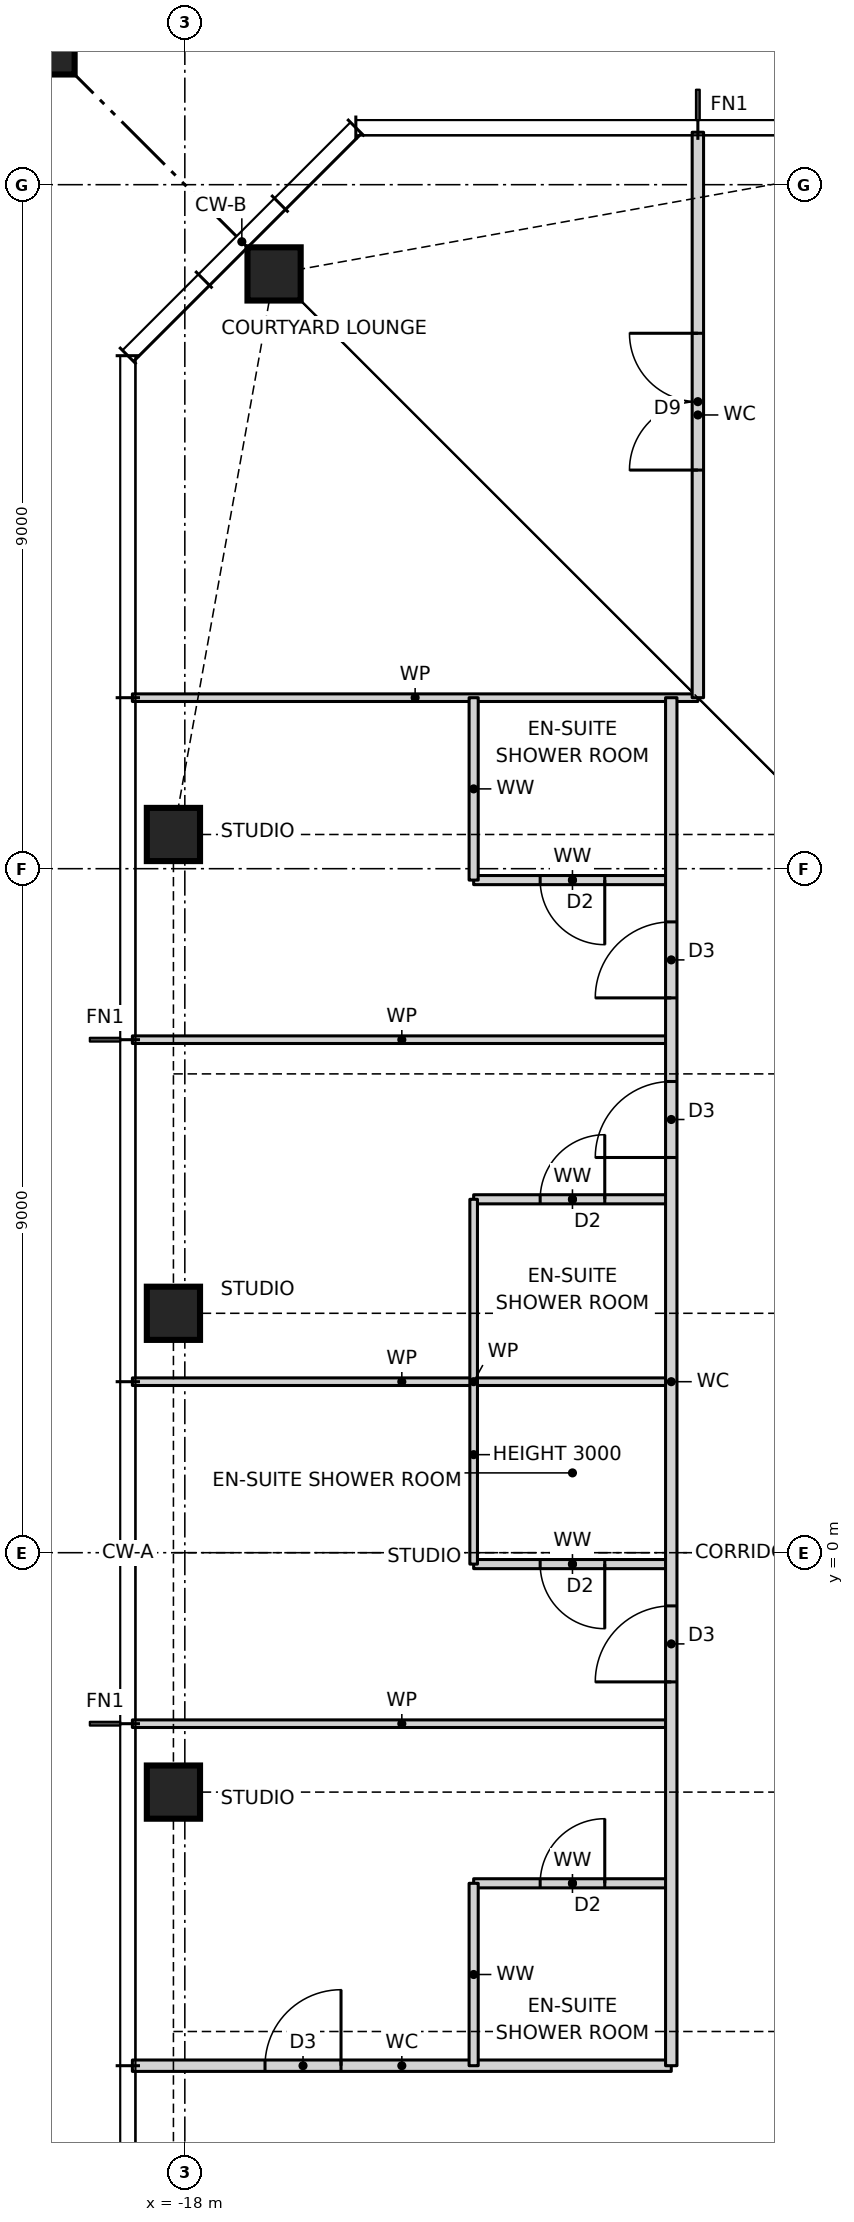
"""IFC4 building model, lengths in metres.
Left out: names, types, materials, properties, quantities, classifications, styles, units other than length and angle.
Written with IfcOpenShell. Run it as: python <this file> out.ifc"""

import sys

from ifc_helpers import new_model, si_unit, direction, frame, frame_2d, origin, origin_2d, place, context, subcontext, project, spatial, rectangle, hollow_rectangle, i_section, extrude, element, fill, save


model = new_model("IFC4")
c1 = context("Model", 3, precision=1e-05, world=origin(), true_north=direction((0.0, 1.0)))
c2 = subcontext(c1, "Body", "Model", "MODEL_VIEW")
j1 = project(units=[si_unit("LENGTHUNIT", "METRE"), si_unit("PLANEANGLEUNIT", "RADIAN")], contexts=[c1])
p1 = place(None, origin())
s1 = spatial("IfcSite", under=j1, at=p1, CompositionType="ELEMENT")
p2 = place(p1, origin())
s2 = spatial("IfcBuilding", under=s1, at=p2, CompositionType="ELEMENT")
p3 = place(p2, frame((0.0, 0.0, 156.5)))
s3 = spatial("IfcBuildingStorey", under=s2, at=p3, CompositionType="ELEMENT", Elevation=156.5)
for number, where, z_axis, x_axis in (
    (1, (-16.826, 16.826, 0.0), (0.0, 0.0, 1.0), (1.0, 0.0, 0.0)),
    (2, (-18.15, 9.45, 0.0), (0.0, 0.0, 1.0), (1.0, 0.0, 0.0)),
    (3, (-18.15, 3.15, 0.0), (0.0, 0.0, 1.0), (1.0, 0.0, 0.0)),
    (4, (-18.15, -3.15, 0.0), (0.0, 0.0, 1.0), (1.0, 0.0, 0.0)),
):
    element("IfcColumn", number, at=place(p3, frame(where, z_axis=z_axis, x_axis=x_axis)), inside=s3, PredefinedType="COLUMN", context=c2, shape_type="SweptSolid", body=[
        extrude(hollow_rectangle(XDim=0.7, YDim=0.7, WallThickness=0.06, at=origin_2d()), origin(), (0.0, 0.0, 1.0), 3.5),
    ])
p4 = place(p3, frame((-21.65, 21.65, 0.0), z_axis=(0.0, 0.0, 1.0), x_axis=(1.0, 0.0, 0.0)))
e5 = element("IfcColumn", 5, at=p4, inside=s3, PredefinedType="COLUMN", context=c2, shape_type="SweptSolid", body=[
    extrude(rectangle(XDim=4.4, YDim=4.4, at=origin_2d()), origin(), (0.0, 0.0, 1.0), 3.5),
    extrude(i_section(OverallWidth=0.478, OverallDepth=0.599, WebThickness=0.1, FlangeThickness=0.14, at=origin_2d()), origin(), (0.0, 0.0, 1.0), 3.5),
])
p5 = place(p3, frame((-18.69, -6.75, 0.0), z_axis=(0.0, 0.0, 1.0), x_axis=(1.0, 0.0, 0.0)))
e6 = element("IfcWall", 6, at=p5, inside=s3, PredefinedType="PARTITIONING", context=c2, shape_type="SweptSolid", body=[
    extrude(rectangle(XDim=7.09, YDim=0.15, at=frame_2d((3.545, 0.0))), origin(), (0.0, 0.0, 1.0), 3.27),
])
p6 = place(p5, frame((1.745, 0.0, 0.0)))
e7 = element("IfcOpeningElement", 7, at=p6, cuts=e6, PredefinedType="OPENING", context=c2, shape_type="SweptSolid", body=[
    extrude(rectangle(XDim=1.0, YDim=2.1, at=frame_2d((0.5, 1.05))), frame((0.0, 0.085, 0.0), z_axis=(0.0, -1.0, 0.0), x_axis=(1.0, 0.0, 0.0)), (0.0, 0.0, 1.0), 0.17),
])
p7 = place(p3, frame((-14.2, -4.35, 0.0), z_axis=(0.0, 0.0, 1.0), x_axis=(1.0, 0.0, 0.0)))
e8 = element("IfcWall", 8, at=p7, inside=s3, PredefinedType="PARTITIONING", context=c2, shape_type="SweptSolid", body=[
    extrude(rectangle(XDim=2.6, YDim=0.12, at=frame_2d((1.3, 0.0))), origin(), (0.0, 0.0, 1.0), 3.27),
])
p8 = place(p7, frame((0.875, 0.0, 0.0)))
e9 = element("IfcOpeningElement", 9, at=p8, cuts=e8, PredefinedType="OPENING", context=c2, shape_type="SweptSolid", body=[
    extrude(rectangle(XDim=0.85, YDim=2.1, at=frame_2d((0.425, 1.05))), frame((0.0, 0.07, 0.0), z_axis=(0.0, -1.0, 0.0), x_axis=(1.0, 0.0, 0.0)), (0.0, 0.0, 1.0), 0.14),
])
p9 = place(p3, frame((-18.69, -2.25, 0.0), z_axis=(0.0, 0.0, 1.0), x_axis=(1.0, 0.0, 0.0)))
e10 = element("IfcWall", 10, at=p9, inside=s3, PredefinedType="PARTITIONING", context=c2, shape_type="SweptSolid", body=[
    extrude(rectangle(XDim=7.09, YDim=0.1, at=frame_2d((3.545, 0.0))), origin(), (0.0, 0.0, 1.0), 3.27),
])
p10 = place(p3, frame((-14.2, -0.15, 0.0), z_axis=(0.0, 0.0, 1.0), x_axis=(1.0, 0.0, 0.0)))
e11 = element("IfcWall", 11, at=p10, inside=s3, PredefinedType="PARTITIONING", context=c2, shape_type="SweptSolid", body=[
    extrude(rectangle(XDim=2.6, YDim=0.12, at=frame_2d((1.3, 0.0))), origin(), (0.0, 0.0, 1.0), 3.27),
])
p11 = place(p10, frame((0.875, 0.0, 0.0)))
e12 = element("IfcOpeningElement", 12, at=p11, cuts=e11, PredefinedType="OPENING", context=c2, shape_type="SweptSolid", body=[
    extrude(rectangle(XDim=0.85, YDim=2.1, at=frame_2d((0.425, 1.05))), frame((0.0, 0.07, 0.0), z_axis=(0.0, -1.0, 0.0), x_axis=(1.0, 0.0, 0.0)), (0.0, 0.0, 1.0), 0.14),
])
p12 = place(p3, frame((-18.69, 2.25, 0.0), z_axis=(0.0, 0.0, 1.0), x_axis=(1.0, 0.0, 0.0)))
e13 = element("IfcWall", 13, at=p12, inside=s3, PredefinedType="PARTITIONING", context=c2, shape_type="SweptSolid", body=[
    extrude(rectangle(XDim=7.09, YDim=0.1, at=frame_2d((3.545, 0.0))), origin(), (0.0, 0.0, 1.0), 3.27),
])
p13 = place(p3, frame((-14.2, 4.65, 0.0), z_axis=(0.0, 0.0, 1.0), x_axis=(1.0, 0.0, 0.0)))
e14 = element("IfcWall", 14, at=p13, inside=s3, PredefinedType="PARTITIONING", context=c2, shape_type="SweptSolid", body=[
    extrude(rectangle(XDim=2.6, YDim=0.12, at=frame_2d((1.3, 0.0))), origin(), (0.0, 0.0, 1.0), 3.27),
])
p14 = place(p13, frame((0.875, 0.0, 0.0)))
e15 = element("IfcOpeningElement", 15, at=p14, cuts=e14, PredefinedType="OPENING", context=c2, shape_type="SweptSolid", body=[
    extrude(rectangle(XDim=0.85, YDim=2.1, at=frame_2d((0.425, 1.05))), frame((0.0, 0.07, 0.0), z_axis=(0.0, -1.0, 0.0), x_axis=(1.0, 0.0, 0.0)), (0.0, 0.0, 1.0), 0.14),
])
p15 = place(p3, frame((-18.69, 6.75, 0.0), z_axis=(0.0, 0.0, 1.0), x_axis=(1.0, 0.0, 0.0)))
e16 = element("IfcWall", 16, at=p15, inside=s3, PredefinedType="PARTITIONING", context=c2, shape_type="SweptSolid", body=[
    extrude(rectangle(XDim=7.09, YDim=0.1, at=frame_2d((3.545, 0.0))), origin(), (0.0, 0.0, 1.0), 3.27),
])
p16 = place(p3, frame((-14.2, 8.85, 0.0), z_axis=(0.0, 0.0, 1.0), x_axis=(1.0, 0.0, 0.0)))
e17 = element("IfcWall", 17, at=p16, inside=s3, PredefinedType="PARTITIONING", context=c2, shape_type="SweptSolid", body=[
    extrude(rectangle(XDim=2.6, YDim=0.12, at=frame_2d((1.3, 0.0))), origin(), (0.0, 0.0, 1.0), 3.27),
])
p17 = place(p16, frame((0.875, 0.0, 0.0)))
e18 = element("IfcOpeningElement", 18, at=p17, cuts=e17, PredefinedType="OPENING", context=c2, shape_type="SweptSolid", body=[
    extrude(rectangle(XDim=0.85, YDim=2.1, at=frame_2d((0.425, 1.05))), frame((0.0, 0.07, 0.0), z_axis=(0.0, -1.0, 0.0), x_axis=(1.0, 0.0, 0.0)), (0.0, 0.0, 1.0), 0.14),
])
p18 = place(p3, frame((-18.69, 11.25, 0.0), z_axis=(0.0, 0.0, 1.0), x_axis=(1.0, 0.0, 0.0)))
e19 = element("IfcWall", 19, at=p18, inside=s3, PredefinedType="PARTITIONING", context=c2, shape_type="SweptSolid", body=[
    extrude(rectangle(XDim=7.44, YDim=0.1, at=frame_2d((3.72, 0.0))), origin(), (0.0, 0.0, 1.0), 3.27),
])
p19 = place(p3, frame((-11.25, 11.25, 0.0), z_axis=(0.0, 0.0, 1.0), x_axis=(0.0, 1.0, 0.0)))
e20 = element("IfcWall", 20, at=p19, inside=s3, PredefinedType="PARTITIONING", context=c2, shape_type="SweptSolid", body=[
    extrude(rectangle(XDim=7.44, YDim=0.15, at=frame_2d((3.72, 0.0))), origin(), (0.0, 0.0, 1.0), 3.27),
])
p20 = place(p19, frame((2.995, 0.0, 0.0)))
e21 = element("IfcOpeningElement", 21, at=p20, cuts=e20, PredefinedType="OPENING", context=c2, shape_type="SweptSolid", body=[
    extrude(rectangle(XDim=1.8, YDim=2.1, at=frame_2d((0.9, 1.05))), frame((0.0, 0.085, 0.0), z_axis=(0.0, -1.0, 0.0), x_axis=(1.0, 0.0, 0.0)), (0.0, 0.0, 1.0), 0.17),
])
p21 = place(p3, frame((-11.6, -6.75, 0.0), z_axis=(0.0, 0.0, 1.0), x_axis=(0.0, 1.0, 0.0)))
e22 = element("IfcWall", 22, at=p21, inside=s3, PredefinedType="PARTITIONING", context=c2, shape_type="SweptSolid", body=[
    extrude(rectangle(XDim=18.0, YDim=0.15, at=frame_2d((9.0, 0.0))), origin(), (0.0, 0.0, 1.0), 3.27),
])
p22 = place(p21, frame((14.05, 0.0, 0.0)))
e23 = element("IfcOpeningElement", 23, at=p22, cuts=e22, PredefinedType="OPENING", context=c2, shape_type="SweptSolid", body=[
    extrude(rectangle(XDim=1.0, YDim=2.1, at=frame_2d((0.5, 1.05))), frame((0.0, 0.085, 0.0), z_axis=(0.0, -1.0, 0.0), x_axis=(1.0, 0.0, 0.0)), (0.0, 0.0, 1.0), 0.17),
])
p23 = place(p21, frame((11.95, 0.0, 0.0)))
e24 = element("IfcOpeningElement", 24, at=p23, cuts=e22, PredefinedType="OPENING", context=c2, shape_type="SweptSolid", body=[
    extrude(rectangle(XDim=1.0, YDim=2.1, at=frame_2d((0.5, 1.05))), frame((0.0, 0.085, 0.0), z_axis=(0.0, -1.0, 0.0), x_axis=(1.0, 0.0, 0.0)), (0.0, 0.0, 1.0), 0.17),
])
p24 = place(p21, frame((5.05, 0.0, 0.0)))
e25 = element("IfcOpeningElement", 25, at=p24, cuts=e22, PredefinedType="OPENING", context=c2, shape_type="SweptSolid", body=[
    extrude(rectangle(XDim=1.0, YDim=2.1, at=frame_2d((0.5, 1.05))), frame((0.0, 0.085, 0.0), z_axis=(0.0, -1.0, 0.0), x_axis=(1.0, 0.0, 0.0)), (0.0, 0.0, 1.0), 0.17),
])
p25 = place(p3, frame((-14.2, -6.75, 0.0), z_axis=(0.0, 0.0, 1.0), x_axis=(0.0, 1.0, 0.0)))
e26 = element("IfcWall", 26, at=p25, inside=s3, PredefinedType="PARTITIONING", context=c2, shape_type="SweptSolid", body=[
    extrude(rectangle(XDim=2.4, YDim=0.12, at=frame_2d((1.2, 0.0))), origin(), (0.0, 0.0, 1.0), 3.27),
])
p26 = place(p3, frame((-14.2, -0.15, 0.0), z_axis=(0.0, 0.0, 1.0), x_axis=(0.0, 1.0, 0.0)))
e27 = element("IfcWall", 27, at=p26, inside=s3, PredefinedType="PARTITIONING", context=c2, shape_type="SweptSolid", body=[
    extrude(rectangle(XDim=4.8, YDim=0.1, at=frame_2d((2.4, 0.0))), origin(), (0.0, 0.0, 1.0), 3.0),
])
p27 = place(p3, frame((-14.2, 8.85, 0.0), z_axis=(0.0, 0.0, 1.0), x_axis=(0.0, 1.0, 0.0)))
e28 = element("IfcWall", 28, at=p27, inside=s3, PredefinedType="PARTITIONING", context=c2, shape_type="SweptSolid", body=[
    extrude(rectangle(XDim=2.4, YDim=0.12, at=frame_2d((1.2, 0.0))), origin(), (0.0, 0.0, 1.0), 3.27),
])
p28 = place(p22, origin())
e29 = element("IfcDoor", 29, at=p28, inside=s3, OperationType="SINGLE_SWING_LEFT", PredefinedType="DOOR", context=c2, shape_type="SweptSolid", body=[
    extrude(rectangle(XDim=1.0, YDim=2.1, at=frame_2d((0.5, 1.05))), frame((0.0, 0.025, 0.0), z_axis=(0.0, -1.0, 0.0), x_axis=(1.0, 0.0, 0.0)), (0.0, 0.0, 1.0), 0.05),
])
fill(e23, e29)
p29 = place(p17, frame((0.85, 0.0, 0.0), z_axis=(0.0, 0.0, 1.0), x_axis=(-1.0, 0.0, 0.0)))
e30 = element("IfcDoor", 30, at=p29, inside=s3, OperationType="SINGLE_SWING_LEFT", PredefinedType="DOOR", context=c2, shape_type="SweptSolid", body=[
    extrude(rectangle(XDim=0.85, YDim=2.1, at=frame_2d((0.425, 1.05))), frame((0.0, 0.025, 0.0), z_axis=(0.0, -1.0, 0.0), x_axis=(1.0, 0.0, 0.0)), (0.0, 0.0, 1.0), 0.05),
])
fill(e18, e30)
p30 = place(p23, origin())
e31 = element("IfcDoor", 31, at=p30, inside=s3, OperationType="SINGLE_SWING_LEFT", PredefinedType="DOOR", context=c2, shape_type="SweptSolid", body=[
    extrude(rectangle(XDim=1.0, YDim=2.1, at=frame_2d((0.5, 1.05))), frame((0.0, 0.025, 0.0), z_axis=(0.0, -1.0, 0.0), x_axis=(1.0, 0.0, 0.0)), (0.0, 0.0, 1.0), 0.05),
])
fill(e24, e31)
p31 = place(p14, origin())
e32 = element("IfcDoor", 32, at=p31, inside=s3, OperationType="SINGLE_SWING_RIGHT", PredefinedType="DOOR", context=c2, shape_type="SweptSolid", body=[
    extrude(rectangle(XDim=0.85, YDim=2.1, at=frame_2d((0.425, 1.05))), frame((0.0, 0.025, 0.0), z_axis=(0.0, -1.0, 0.0), x_axis=(1.0, 0.0, 0.0)), (0.0, 0.0, 1.0), 0.05),
])
fill(e15, e32)
p32 = place(p24, origin())
e33 = element("IfcDoor", 33, at=p32, inside=s3, OperationType="SINGLE_SWING_LEFT", PredefinedType="DOOR", context=c2, shape_type="SweptSolid", body=[
    extrude(rectangle(XDim=1.0, YDim=2.1, at=frame_2d((0.5, 1.05))), frame((0.0, 0.025, 0.0), z_axis=(0.0, -1.0, 0.0), x_axis=(1.0, 0.0, 0.0)), (0.0, 0.0, 1.0), 0.05),
])
fill(e25, e33)
p33 = place(p11, frame((0.85, 0.0, 0.0), z_axis=(0.0, 0.0, 1.0), x_axis=(-1.0, 0.0, 0.0)))
e34 = element("IfcDoor", 34, at=p33, inside=s3, OperationType="SINGLE_SWING_LEFT", PredefinedType="DOOR", context=c2, shape_type="SweptSolid", body=[
    extrude(rectangle(XDim=0.85, YDim=2.1, at=frame_2d((0.425, 1.05))), frame((0.0, 0.025, 0.0), z_axis=(0.0, -1.0, 0.0), x_axis=(1.0, 0.0, 0.0)), (0.0, 0.0, 1.0), 0.05),
])
fill(e12, e34)
p34 = place(p6, origin())
e35 = element("IfcDoor", 35, at=p34, inside=s3, OperationType="SINGLE_SWING_RIGHT", PredefinedType="DOOR", context=c2, shape_type="SweptSolid", body=[
    extrude(rectangle(XDim=1.0, YDim=2.1, at=frame_2d((0.5, 1.05))), frame((0.0, 0.025, 0.0), z_axis=(0.0, -1.0, 0.0), x_axis=(1.0, 0.0, 0.0)), (0.0, 0.0, 1.0), 0.05),
])
fill(e7, e35)
p35 = place(p8, origin())
e36 = element("IfcDoor", 36, at=p35, inside=s3, OperationType="SINGLE_SWING_RIGHT", PredefinedType="DOOR", context=c2, shape_type="SweptSolid", body=[
    extrude(rectangle(XDim=0.85, YDim=2.1, at=frame_2d((0.425, 1.05))), frame((0.0, 0.025, 0.0), z_axis=(0.0, -1.0, 0.0), x_axis=(1.0, 0.0, 0.0)), (0.0, 0.0, 1.0), 0.05),
])
fill(e9, e36)
p36 = place(p20, origin())
e37 = element("IfcDoor", 37, at=p36, inside=s3, OperationType="DOUBLE_DOOR_SINGLE_SWING", PredefinedType="DOOR", context=c2, shape_type="SweptSolid", body=[
    extrude(rectangle(XDim=1.8, YDim=2.1, at=frame_2d((0.9, 1.05))), frame((0.0, 0.025, 0.0), z_axis=(0.0, -1.0, 0.0), x_axis=(1.0, 0.0, 0.0)), (0.0, 0.0, 1.0), 0.05),
])
fill(e21, e37)
save(model, sys.argv[1])
